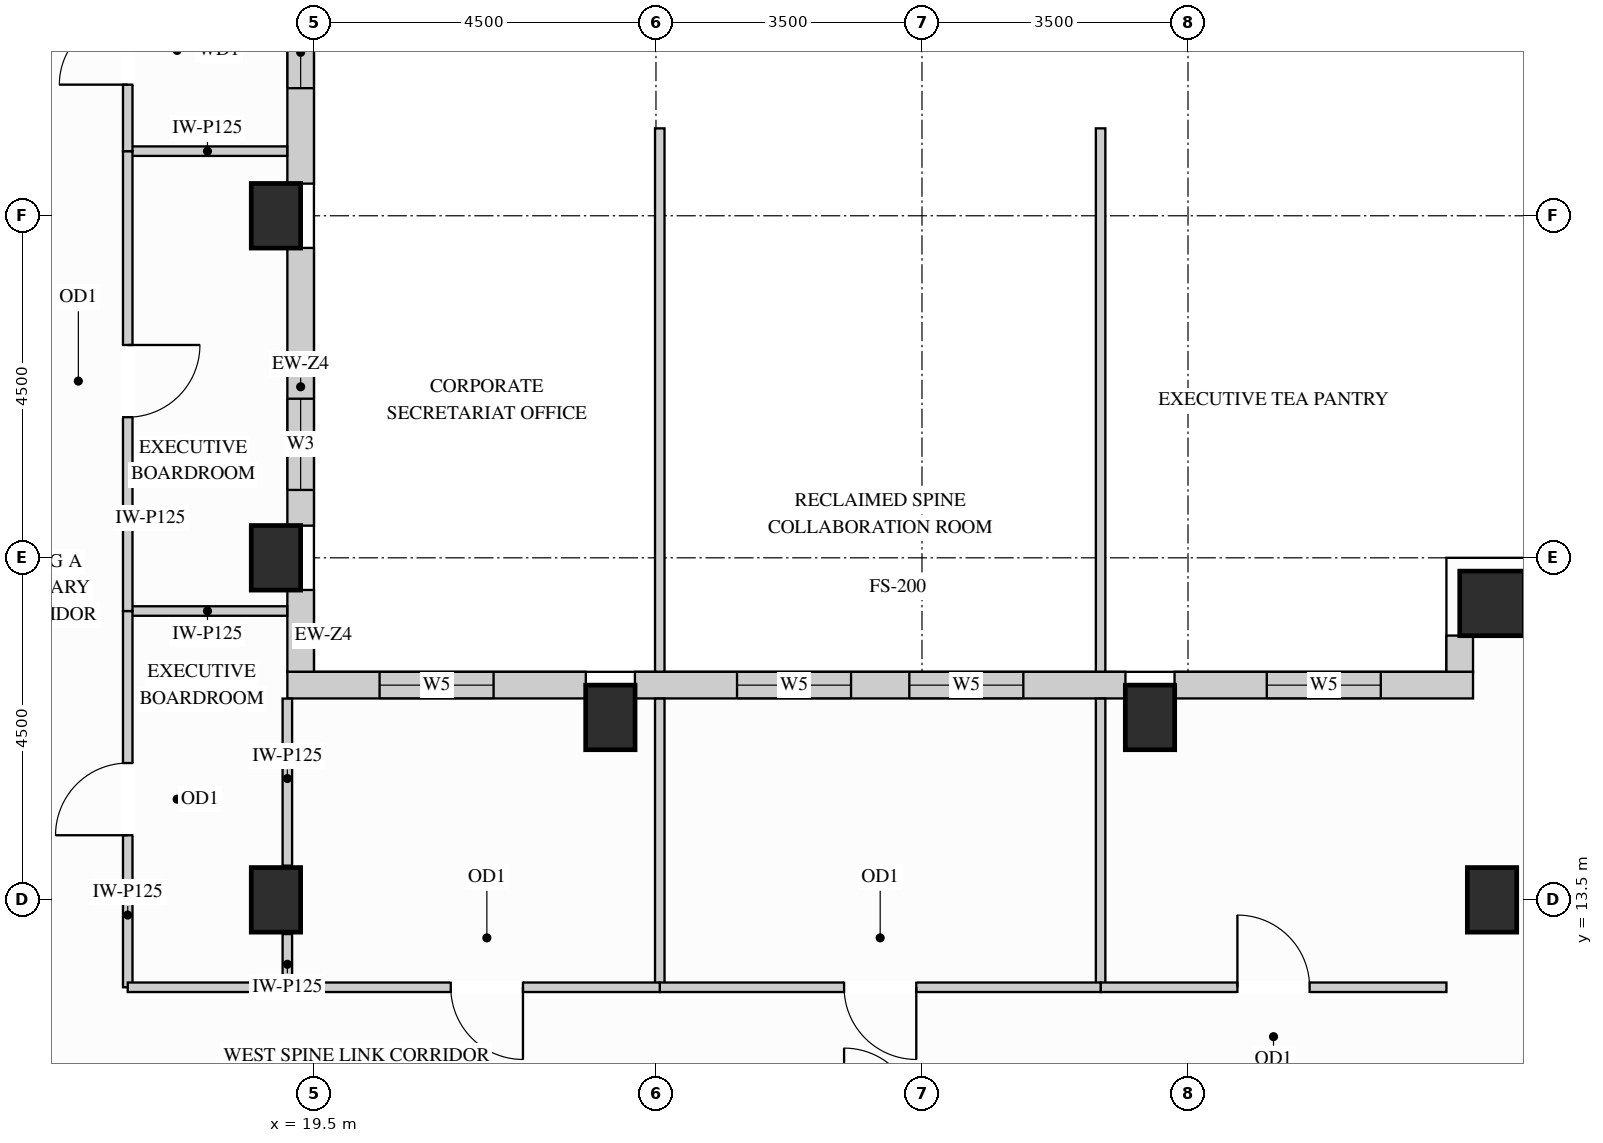
"""IFC4 building model, lengths in metres.
Left out: names, types, materials, properties, quantities, classifications, styles, units other than length and angle.
Written with IfcOpenShell. Run it as: python <this file> out.ifc"""

import sys

from ifc_helpers import new_model, si_unit, direction, frame, frame_2d, origin, origin_2d, place, context, subcontext, project, spatial, rectangle, extrude, source, transform, mapped, element, fill, save


model = new_model("IFC4")
c1 = context("Model", 3, precision=1e-05, world=origin(), true_north=direction((0.0, 1.0)))
c2 = subcontext(c1, "Body", "Model", "MODEL_VIEW")
j1 = project(units=[si_unit("LENGTHUNIT", "METRE"), si_unit("PLANEANGLEUNIT", "RADIAN")], contexts=[c1])
p1 = place(None, origin())
s1 = spatial("IfcSite", under=j1, at=p1, CompositionType="ELEMENT")
p2 = place(p1, origin())
s2 = spatial("IfcBuilding", under=s1, at=p2, CompositionType="ELEMENT")
p3 = place(p2, frame((0.0, 0.0, 223.2)))
s3 = spatial("IfcBuildingStorey", under=s2, at=p3, CompositionType="ELEMENT", Elevation=223.2)
m1 = source(origin(), c2, "Body", "SweptSolid", [
    extrude(rectangle(XDim=0.65, YDim=0.85, at=origin_2d()), origin(), (0.0, 0.0, 1.0), 3.4),
])
for number, where, z_axis, x_axis in (
    (1, (19.0, 13.5, 0.0), (0.0, 0.0, 1.0), (1.0, 0.0, 0.0)),
    (2, (19.0, 18.0, 0.0), (0.0, 0.0, 1.0), (1.0, 0.0, 0.0)),
    (3, (19.0, 22.5, 0.0), (0.0, 0.0, 1.0), (1.0, 0.0, 0.0)),
    (4, (35.0, 13.5, 0.0), (0.0, 0.0, 1.0), (1.0, 0.0, 0.0)),
    (5, (23.4, 15.9, 0.0), (0.0, 0.0, 1.0), (1.0, 0.0, 0.0)),
    (6, (30.5, 15.9, 0.0), (0.0, 0.0, 1.0), (1.0, 0.0, 0.0)),
):
    element("IfcColumn", number, at=place(p3, frame(where, z_axis=z_axis, x_axis=x_axis)), inside=s3, PredefinedType="COLUMN", context=c2, shape_type="MappedRepresentation", body=[
        mapped(m1, transform((0.0, 0.0, 0.0), x_axis=(1.0, 0.0, 0.0), y_axis=(0.0, 1.0, 0.0), z_axis=(0.0, 0.0, 1.0))),
    ])
m2 = source(origin(), c2, "Body", "SweptSolid", [
    extrude(rectangle(XDim=0.85, YDim=0.85, at=origin_2d()), origin(), (0.0, 0.0, 1.0), 3.4),
])
p4 = place(p3, frame((35.0, 17.4, 0.0), z_axis=(0.0, 0.0, 1.0), x_axis=(1.0, 0.0, 0.0)))
e7 = element("IfcColumn", 7, at=p4, inside=s3, PredefinedType="COLUMN", context=c2, shape_type="MappedRepresentation", body=[
    mapped(m2, transform((0.0, 0.0, 0.0), x_axis=(1.0, 0.0, 0.0), y_axis=(0.0, 1.0, 0.0), z_axis=(0.0, 0.0, 1.0))),
])
m3 = source(origin(), c2, "Body", "SweptSolid", [
    extrude(rectangle(XDim=1.079, YDim=0.35, at=frame_2d((0.54, 0.0))), origin(), (0.0, 0.0, 1.0), 2.619),
])
p5 = place(p3, frame((19.325, 16.498, 0.0), z_axis=(0.0, 0.0, 1.0), x_axis=(0.0, 1.0, 0.0)))
e8 = element("IfcWall", 8, at=p5, inside=s3, PredefinedType="SOLIDWALL", context=c2, shape_type="MappedRepresentation", body=[
    mapped(m3, transform((0.0, 0.0, 0.0), x_axis=(1.0, 0.0, 0.0), y_axis=(0.0, 1.0, 0.0), z_axis=(0.0, 0.0, 1.0))),
])
p6 = place(p3, frame((19.325, 18.423, 0.0), z_axis=(0.0, 0.0, 1.0), x_axis=(0.0, 1.0, 0.0)))
e9 = element("IfcWall", 9, at=p6, inside=s3, PredefinedType="SOLIDWALL", context=c2, shape_type="SweptSolid", body=[
    extrude(rectangle(XDim=3.654, YDim=0.35, at=frame_2d((1.827, 0.0))), origin(), (0.0, 0.0, 1.0), 2.619),
])
p7 = place(p6, frame((0.47, 0.0, 0.78)))
e10 = element("IfcOpeningElement", 10, at=p7, cuts=e9, PredefinedType="OPENING", context=c2, shape_type="SweptSolid", body=[
    extrude(rectangle(XDim=1.2, YDim=1.659, at=frame_2d((0.6, 0.83))), frame((0.0, 0.185, 0.0), z_axis=(0.0, -1.0, 0.0), x_axis=(1.0, 0.0, 0.0)), (0.0, 0.0, 1.0), 0.37),
])
p8 = place(p3, frame((19.325, 22.923, 0.0), z_axis=(0.0, 0.0, 1.0), x_axis=(0.0, 1.0, 0.0)))
e11 = element("IfcWall", 11, at=p8, inside=s3, PredefinedType="SOLIDWALL", context=c2, shape_type="SweptSolid", body=[
    extrude(rectangle(XDim=3.454, YDim=0.35, at=frame_2d((1.727, 0.0))), origin(), (0.0, 0.0, 1.0), 2.619),
])
p9 = place(p8, frame((1.256, 0.0, 0.78)))
e12 = element("IfcOpeningElement", 12, at=p9, cuts=e11, PredefinedType="OPENING", context=c2, shape_type="SweptSolid", body=[
    extrude(rectangle(XDim=1.5, YDim=1.659, at=frame_2d((0.75, 0.83))), frame((0.0, 0.185, 0.0), z_axis=(0.0, -1.0, 0.0), x_axis=(1.0, 0.0, 0.0)), (0.0, 0.0, 1.0), 0.37),
])
m4 = source(origin(), c2, "Body", "SweptSolid", [
    extrude(rectangle(XDim=0.479, YDim=0.35, at=frame_2d((0.24, 0.0))), origin(), (0.0, 0.0, 1.0), 3.385),
])
p10 = place(p3, frame((34.575, 16.977, 0.0), z_axis=(0.0, 0.0, 1.0), x_axis=(0.0, -1.0, 0.0)))
e13 = element("IfcWall", 13, at=p10, inside=s3, PredefinedType="SOLIDWALL", context=c2, shape_type="MappedRepresentation", body=[
    mapped(m4, transform((0.0, 0.0, 0.0), x_axis=(1.0, 0.0, 0.0), y_axis=(0.0, 1.0, 0.0), z_axis=(0.0, 0.0, 1.0))),
])
p11 = place(p3, frame((34.75, 16.325, 0.0), z_axis=(0.0, 0.0, 1.0), x_axis=(-1.0, 0.0, 0.0)))
e14 = element("IfcWall", 14, at=p11, inside=s3, PredefinedType="SOLIDWALL", context=c2, shape_type="SweptSolid", body=[
    extrude(rectangle(XDim=3.927, YDim=0.35, at=frame_2d((1.963, 0.0))), origin(), (0.0, 0.0, 1.0), 3.385),
])
p12 = place(p11, frame((1.213, 0.0, 0.78)))
e15 = element("IfcOpeningElement", 15, at=p12, cuts=e14, PredefinedType="OPENING", context=c2, shape_type="SweptSolid", body=[
    extrude(rectangle(XDim=1.5, YDim=2.0, at=frame_2d((0.75, 1.0))), frame((0.0, 0.185, 0.0), z_axis=(0.0, -1.0, 0.0), x_axis=(1.0, 0.0, 0.0)), (0.0, 0.0, 1.0), 0.37),
])
p13 = place(p3, frame((30.177, 16.325, 0.0), z_axis=(0.0, 0.0, 1.0), x_axis=(-1.0, 0.0, 0.0)))
e16 = element("IfcWall", 16, at=p13, inside=s3, PredefinedType="SOLIDWALL", context=c2, shape_type="SweptSolid", body=[
    extrude(rectangle(XDim=6.454, YDim=0.35, at=frame_2d((3.227, 0.0))), origin(), (0.0, 0.0, 1.0), 3.385),
])
p14 = place(p13, frame((1.344, 0.0, 0.78)))
e17 = element("IfcOpeningElement", 17, at=p14, cuts=e16, PredefinedType="OPENING", context=c2, shape_type="SweptSolid", body=[
    extrude(rectangle(XDim=1.5, YDim=2.0, at=frame_2d((0.75, 1.0))), frame((0.0, 0.185, 0.0), z_axis=(0.0, -1.0, 0.0), x_axis=(1.0, 0.0, 0.0)), (0.0, 0.0, 1.0), 0.37),
])
p15 = place(p13, frame((3.61, 0.0, 0.78)))
e18 = element("IfcOpeningElement", 18, at=p15, cuts=e16, PredefinedType="OPENING", context=c2, shape_type="SweptSolid", body=[
    extrude(rectangle(XDim=1.5, YDim=2.0, at=frame_2d((0.75, 1.0))), frame((0.0, 0.185, 0.0), z_axis=(0.0, -1.0, 0.0), x_axis=(1.0, 0.0, 0.0)), (0.0, 0.0, 1.0), 0.37),
])
p16 = place(p3, frame((23.077, 16.325, 0.0), z_axis=(0.0, 0.0, 1.0), x_axis=(-1.0, 0.0, 0.0)))
e19 = element("IfcWall", 19, at=p16, inside=s3, PredefinedType="SOLIDWALL", context=c2, shape_type="SweptSolid", body=[
    extrude(rectangle(XDim=3.927, YDim=0.35, at=frame_2d((1.963, 0.0))), origin(), (0.0, 0.0, 1.0), 3.385),
])
p17 = place(p16, frame((1.213, 0.0, 0.78)))
e20 = element("IfcOpeningElement", 20, at=p17, cuts=e19, PredefinedType="OPENING", context=c2, shape_type="SweptSolid", body=[
    extrude(rectangle(XDim=1.5, YDim=2.0, at=frame_2d((0.75, 1.0))), frame((0.0, 0.185, 0.0), z_axis=(0.0, -1.0, 0.0), x_axis=(1.0, 0.0, 0.0)), (0.0, 0.0, 1.0), 0.37),
])
m5 = source(origin(), c2, "Body", "SweptSolid", [
    extrude(rectangle(XDim=2.098, YDim=0.125, at=frame_2d((1.049, 0.0))), origin(), (0.0, 0.0, 1.0), 3.385),
])
for number, where, z_axis, x_axis in (
    (21, (17.05, 17.3, 0.0), (0.0, 0.0, 1.0), (1.0, 0.0, 0.0)),
    (22, (17.05, 23.35, 0.0), (0.0, 0.0, 1.0), (1.0, 0.0, 0.0)),
):
    element("IfcWall", number, at=place(p3, frame(where, z_axis=z_axis, x_axis=x_axis)), inside=s3, PredefinedType="PARTITIONING", context=c2, shape_type="MappedRepresentation", body=[
        mapped(m5, transform((0.0, 0.0, 0.0), x_axis=(1.0, 0.0, 0.0), y_axis=(0.0, 1.0, 0.0), z_axis=(0.0, 0.0, 1.0))),
    ])
m6 = source(origin(), c2, "Body", "SweptSolid", [
    extrude(rectangle(XDim=0.7, YDim=0.125, at=frame_2d((0.35, 0.0))), origin(), (0.0, 0.0, 1.0), 2.773),
])
p18 = place(p3, frame((19.15, 12.35, 0.0), z_axis=(0.0, 0.0, 1.0), x_axis=(0.0, 1.0, 0.0)))
e23 = element("IfcWall", 23, at=p18, inside=s3, PredefinedType="PARTITIONING", context=c2, shape_type="MappedRepresentation", body=[
    mapped(m6, transform((0.0, 0.0, 0.0), x_axis=(1.0, 0.0, 0.0), y_axis=(0.0, 1.0, 0.0), z_axis=(0.0, 0.0, 1.0))),
])
m7 = source(origin(), c2, "Body", "SweptSolid", [
    extrude(rectangle(XDim=2.198, YDim=0.125, at=frame_2d((1.099, 0.0))), origin(), (0.0, 0.0, 1.0), 2.619),
])
p19 = place(p3, frame((19.15, 13.95, 0.0), z_axis=(0.0, 0.0, 1.0), x_axis=(0.0, 1.0, 0.0)))
e24 = element("IfcWall", 24, at=p19, inside=s3, PredefinedType="PARTITIONING", context=c2, shape_type="MappedRepresentation", body=[
    mapped(m7, transform((0.0, 0.0, 0.0), x_axis=(1.0, 0.0, 0.0), y_axis=(0.0, 1.0, 0.0), z_axis=(0.0, 0.0, 1.0))),
])
p20 = place(p3, frame((17.05, 12.35, 0.0), z_axis=(0.0, 0.0, 1.0), x_axis=(0.0, 1.0, 0.0)))
e25 = element("IfcWall", 25, at=p20, inside=s3, PredefinedType="PARTITIONING", context=c2, shape_type="SweptSolid", body=[
    extrude(rectangle(XDim=4.95, YDim=0.125, at=frame_2d((2.475, 0.0))), origin(), (0.0, 0.0, 1.0), 3.385),
])
p21 = place(p20, frame((2.0, 0.0, 0.0)))
e26 = element("IfcOpeningElement", 26, at=p21, cuts=e25, PredefinedType="OPENING", context=c2, shape_type="SweptSolid", body=[
    extrude(rectangle(XDim=0.95, YDim=2.15, at=frame_2d((0.475, 1.075))), frame((0.0, 0.073, 0.0), z_axis=(0.0, -1.0, 0.0), x_axis=(1.0, 0.0, 0.0)), (0.0, 0.0, 1.0), 0.145),
])
p22 = place(p3, frame((17.05, 17.3, 0.0), z_axis=(0.0, 0.0, 1.0), x_axis=(0.0, 1.0, 0.0)))
e27 = element("IfcWall", 27, at=p22, inside=s3, PredefinedType="PARTITIONING", context=c2, shape_type="SweptSolid", body=[
    extrude(rectangle(XDim=6.05, YDim=0.125, at=frame_2d((3.025, 0.0))), origin(), (0.0, 0.0, 1.0), 3.385),
])
p23 = place(p22, frame((2.55, 0.0, 0.0)))
e28 = element("IfcOpeningElement", 28, at=p23, cuts=e27, PredefinedType="OPENING", context=c2, shape_type="SweptSolid", body=[
    extrude(rectangle(XDim=0.95, YDim=2.15, at=frame_2d((0.475, 1.075))), frame((0.0, 0.073, 0.0), z_axis=(0.0, -1.0, 0.0), x_axis=(1.0, 0.0, 0.0)), (0.0, 0.0, 1.0), 0.145),
])
p24 = place(p3, frame((17.05, 23.35, 0.0), z_axis=(0.0, 0.0, 1.0), x_axis=(0.0, 1.0, 0.0)))
e29 = element("IfcWall", 29, at=p24, inside=s3, PredefinedType="PARTITIONING", context=c2, shape_type="SweptSolid", body=[
    extrude(rectangle(XDim=2.7, YDim=0.125, at=frame_2d((1.35, 0.0))), origin(), (0.0, 0.0, 1.0), 3.385),
])
p25 = place(p24, frame((0.875, 0.0, 0.0)))
e30 = element("IfcOpeningElement", 30, at=p25, cuts=e29, PredefinedType="OPENING", context=c2, shape_type="SweptSolid", body=[
    extrude(rectangle(XDim=0.9, YDim=2.15, at=frame_2d((0.45, 1.075))), frame((0.0, 0.073, 0.0), z_axis=(0.0, -1.0, 0.0), x_axis=(1.0, 0.0, 0.0)), (0.0, 0.0, 1.0), 0.145),
])
m8 = source(origin(), c2, "Body", "SweptSolid", [
    extrude(rectangle(XDim=3.798, YDim=0.125, at=frame_2d((1.899, 0.0))), origin(), (0.0, 0.0, 1.0), 3.385),
])
p26 = place(p3, frame((24.05, 12.35, 0.0), z_axis=(0.0, 0.0, 1.0), x_axis=(0.0, 1.0, 0.0)))
e31 = element("IfcWall", 31, at=p26, inside=s3, PredefinedType="PARTITIONING", context=c2, shape_type="MappedRepresentation", body=[
    mapped(m8, transform((0.0, 0.0, 0.0), x_axis=(1.0, 0.0, 0.0), y_axis=(0.0, 1.0, 0.0), z_axis=(0.0, 0.0, 1.0))),
])
m9 = source(origin(), c2, "Body", "SweptSolid", [
    extrude(rectangle(XDim=7.148, YDim=0.125, at=frame_2d((3.574, 0.0))), origin(), (0.0, 0.0, 1.0), 3.385),
])
p27 = place(p3, frame((24.05, 16.502, 0.0), z_axis=(0.0, 0.0, 1.0), x_axis=(0.0, 1.0, 0.0)))
e32 = element("IfcWall", 32, at=p27, inside=s3, PredefinedType="PARTITIONING", context=c2, shape_type="MappedRepresentation", body=[
    mapped(m9, transform((0.0, 0.0, 0.0), x_axis=(1.0, 0.0, 0.0), y_axis=(0.0, 1.0, 0.0), z_axis=(0.0, 0.0, 1.0))),
])
p28 = place(p3, frame((29.85, 12.35, 0.0), z_axis=(0.0, 0.0, 1.0), x_axis=(0.0, 1.0, 0.0)))
e33 = element("IfcWall", 33, at=p28, inside=s3, PredefinedType="PARTITIONING", context=c2, shape_type="MappedRepresentation", body=[
    mapped(m8, transform((0.0, 0.0, 0.0), x_axis=(1.0, 0.0, 0.0), y_axis=(0.0, 1.0, 0.0), z_axis=(0.0, 0.0, 1.0))),
])
p29 = place(p3, frame((29.85, 16.502, 0.0), z_axis=(0.0, 0.0, 1.0), x_axis=(0.0, 1.0, 0.0)))
e34 = element("IfcWall", 34, at=p29, inside=s3, PredefinedType="PARTITIONING", context=c2, shape_type="MappedRepresentation", body=[
    mapped(m9, transform((0.0, 0.0, 0.0), x_axis=(1.0, 0.0, 0.0), y_axis=(0.0, 1.0, 0.0), z_axis=(0.0, 0.0, 1.0))),
])
p30 = place(p3, frame((29.85, 12.35, 0.0), z_axis=(0.0, 0.0, 1.0), x_axis=(1.0, 0.0, 0.0)))
e35 = element("IfcWall", 35, at=p30, inside=s3, PredefinedType="PARTITIONING", context=c2, shape_type="SweptSolid", body=[
    extrude(rectangle(XDim=4.55, YDim=0.125, at=frame_2d((2.275, 0.0))), origin(), (0.0, 0.0, 1.0), 3.385),
])
p31 = place(p30, frame((1.8, 0.0, 0.0)))
e36 = element("IfcOpeningElement", 36, at=p31, cuts=e35, PredefinedType="OPENING", context=c2, shape_type="SweptSolid", body=[
    extrude(rectangle(XDim=0.95, YDim=2.15, at=frame_2d((0.475, 1.075))), frame((0.0, 0.073, 0.0), z_axis=(0.0, -1.0, 0.0), x_axis=(1.0, 0.0, 0.0)), (0.0, 0.0, 1.0), 0.145),
])
p32 = place(p3, frame((24.05, 12.35, 0.0), z_axis=(0.0, 0.0, 1.0), x_axis=(1.0, 0.0, 0.0)))
e37 = element("IfcWall", 37, at=p32, inside=s3, PredefinedType="PARTITIONING", context=c2, shape_type="SweptSolid", body=[
    extrude(rectangle(XDim=5.8, YDim=0.125, at=frame_2d((2.9, 0.0))), origin(), (0.0, 0.0, 1.0), 3.385),
])
p33 = place(p32, frame((2.425, 0.0, 0.0)))
e38 = element("IfcOpeningElement", 38, at=p33, cuts=e37, PredefinedType="OPENING", context=c2, shape_type="SweptSolid", body=[
    extrude(rectangle(XDim=0.95, YDim=2.15, at=frame_2d((0.475, 1.075))), frame((0.0, 0.073, 0.0), z_axis=(0.0, -1.0, 0.0), x_axis=(1.0, 0.0, 0.0)), (0.0, 0.0, 1.0), 0.145),
])
m10 = source(origin(), c2, "Body", "SweptSolid", [
    extrude(rectangle(XDim=2.45, YDim=0.125, at=frame_2d((1.225, 0.0))), origin(), (0.0, 0.0, 1.0), 3.385),
])
p34 = place(p3, frame((17.05, 12.35, 0.0), z_axis=(0.0, 0.0, 1.0), x_axis=(1.0, 0.0, 0.0)))
e39 = element("IfcWall", 39, at=p34, inside=s3, PredefinedType="PARTITIONING", context=c2, shape_type="MappedRepresentation", body=[
    mapped(m10, transform((0.0, 0.0, 0.0), x_axis=(1.0, 0.0, 0.0), y_axis=(0.0, 1.0, 0.0), z_axis=(0.0, 0.0, 1.0))),
])
p35 = place(p3, frame((19.5, 12.35, 0.0), z_axis=(0.0, 0.0, 1.0), x_axis=(1.0, 0.0, 0.0)))
e40 = element("IfcWall", 40, at=p35, inside=s3, PredefinedType="PARTITIONING", context=c2, shape_type="SweptSolid", body=[
    extrude(rectangle(XDim=4.55, YDim=0.125, at=frame_2d((2.275, 0.0))), origin(), (0.0, 0.0, 1.0), 3.385),
])
p36 = place(p35, frame((1.8, 0.0, 0.0)))
e41 = element("IfcOpeningElement", 41, at=p36, cuts=e40, PredefinedType="OPENING", context=c2, shape_type="SweptSolid", body=[
    extrude(rectangle(XDim=0.95, YDim=2.15, at=frame_2d((0.475, 1.075))), frame((0.0, 0.073, 0.0), z_axis=(0.0, -1.0, 0.0), x_axis=(1.0, 0.0, 0.0)), (0.0, 0.0, 1.0), 0.145),
])
m11 = source(origin(), c2, "Body", "SweptSolid", [
    extrude(rectangle(XDim=0.95, YDim=2.15, at=frame_2d((0.475, 1.075))), frame((0.0, 0.025, 0.0), z_axis=(0.0, -1.0, 0.0), x_axis=(1.0, 0.0, 0.0)), (0.0, 0.0, 1.0), 0.05),
])
p37 = place(p21, origin())
e42 = element("IfcDoor", 42, at=p37, inside=s3, OperationType="SINGLE_SWING_LEFT", PredefinedType="DOOR", context=c2, shape_type="MappedRepresentation", body=[
    mapped(m11, transform((0.0, 0.0, 0.0), x_axis=(1.0, 0.0, 0.0), y_axis=(0.0, 1.0, 0.0), z_axis=(0.0, 0.0, 1.0))),
])
fill(e26, e42)
p38 = place(p23, origin())
e43 = element("IfcDoor", 43, at=p38, inside=s3, OperationType="SINGLE_SWING_RIGHT", PredefinedType="DOOR", context=c2, shape_type="MappedRepresentation", body=[
    mapped(m11, transform((0.0, 0.0, 0.0), x_axis=(1.0, 0.0, 0.0), y_axis=(0.0, 1.0, 0.0), z_axis=(0.0, 0.0, 1.0))),
])
fill(e28, e43)
p39 = place(p33, origin())
e44 = element("IfcDoor", 44, at=p39, inside=s3, OperationType="SINGLE_SWING_RIGHT", PredefinedType="DOOR", context=c2, shape_type="MappedRepresentation", body=[
    mapped(m11, transform((0.0, 0.0, 0.0), x_axis=(1.0, 0.0, 0.0), y_axis=(0.0, 1.0, 0.0), z_axis=(0.0, 0.0, 1.0))),
])
fill(e38, e44)
p40 = place(p36, origin())
e45 = element("IfcDoor", 45, at=p40, inside=s3, OperationType="SINGLE_SWING_RIGHT", PredefinedType="DOOR", context=c2, shape_type="MappedRepresentation", body=[
    mapped(m11, transform((0.0, 0.0, 0.0), x_axis=(1.0, 0.0, 0.0), y_axis=(0.0, 1.0, 0.0), z_axis=(0.0, 0.0, 1.0))),
])
fill(e41, e45)
p41 = place(p31, origin())
e46 = element("IfcDoor", 46, at=p41, inside=s3, OperationType="SINGLE_SWING_LEFT", PredefinedType="DOOR", context=c2, shape_type="MappedRepresentation", body=[
    mapped(m11, transform((0.0, 0.0, 0.0), x_axis=(1.0, 0.0, 0.0), y_axis=(0.0, 1.0, 0.0), z_axis=(0.0, 0.0, 1.0))),
])
fill(e36, e46)
m12 = source(origin(), c2, "Body", "SweptSolid", [
    extrude(rectangle(XDim=0.9, YDim=2.15, at=frame_2d((0.45, 1.075))), frame((0.0, 0.025, 0.0), z_axis=(0.0, -1.0, 0.0), x_axis=(1.0, 0.0, 0.0)), (0.0, 0.0, 1.0), 0.05),
])
p42 = place(p25, origin())
e47 = element("IfcDoor", 47, at=p42, inside=s3, OperationType="SINGLE_SWING_LEFT", PredefinedType="DOOR", context=c2, shape_type="MappedRepresentation", body=[
    mapped(m12, transform((0.0, 0.0, 0.0), x_axis=(1.0, 0.0, 0.0), y_axis=(0.0, 1.0, 0.0), z_axis=(0.0, 0.0, 1.0))),
])
fill(e30, e47)
m13 = source(origin(), c2, "Body", "SweptSolid", [
    extrude(rectangle(XDim=1.2, YDim=1.659, at=frame_2d((0.6, 0.83))), frame((0.0, 0.03, 0.0), z_axis=(0.0, -1.0, 0.0), x_axis=(1.0, 0.0, 0.0)), (0.0, 0.0, 1.0), 0.06),
])
p43 = place(p7, origin())
e48 = element("IfcWindow", 48, at=p43, inside=s3, PartitioningType="SINGLE_PANEL", PredefinedType="WINDOW", context=c2, shape_type="MappedRepresentation", body=[
    mapped(m13, transform((0.0, 0.0, 0.0), x_axis=(1.0, 0.0, 0.0), y_axis=(0.0, 1.0, 0.0), z_axis=(0.0, 0.0, 1.0))),
])
fill(e10, e48)
m14 = source(origin(), c2, "Body", "SweptSolid", [
    extrude(rectangle(XDim=1.5, YDim=1.659, at=frame_2d((0.75, 0.83))), frame((0.0, 0.03, 0.0), z_axis=(0.0, -1.0, 0.0), x_axis=(1.0, 0.0, 0.0)), (0.0, 0.0, 1.0), 0.06),
])
p44 = place(p9, origin())
e49 = element("IfcWindow", 49, at=p44, inside=s3, PartitioningType="SINGLE_PANEL", PredefinedType="WINDOW", context=c2, shape_type="MappedRepresentation", body=[
    mapped(m14, transform((0.0, 0.0, 0.0), x_axis=(1.0, 0.0, 0.0), y_axis=(0.0, 1.0, 0.0), z_axis=(0.0, 0.0, 1.0))),
])
fill(e12, e49)
m15 = source(origin(), c2, "Body", "SweptSolid", [
    extrude(rectangle(XDim=1.5, YDim=2.0, at=frame_2d((0.75, 1.0))), frame((0.0, 0.03, 0.0), z_axis=(0.0, -1.0, 0.0), x_axis=(1.0, 0.0, 0.0)), (0.0, 0.0, 1.0), 0.06),
])
p45 = place(p12, origin())
e50 = element("IfcWindow", 50, at=p45, inside=s3, PartitioningType="SINGLE_PANEL", PredefinedType="WINDOW", context=c2, shape_type="MappedRepresentation", body=[
    mapped(m15, transform((0.0, 0.0, 0.0), x_axis=(1.0, 0.0, 0.0), y_axis=(0.0, 1.0, 0.0), z_axis=(0.0, 0.0, 1.0))),
])
fill(e15, e50)
p46 = place(p14, origin())
e51 = element("IfcWindow", 51, at=p46, inside=s3, PartitioningType="SINGLE_PANEL", PredefinedType="WINDOW", context=c2, shape_type="MappedRepresentation", body=[
    mapped(m15, transform((0.0, 0.0, 0.0), x_axis=(1.0, 0.0, 0.0), y_axis=(0.0, 1.0, 0.0), z_axis=(0.0, 0.0, 1.0))),
])
fill(e17, e51)
p47 = place(p15, origin())
e52 = element("IfcWindow", 52, at=p47, inside=s3, PartitioningType="SINGLE_PANEL", PredefinedType="WINDOW", context=c2, shape_type="MappedRepresentation", body=[
    mapped(m15, transform((0.0, 0.0, 0.0), x_axis=(1.0, 0.0, 0.0), y_axis=(0.0, 1.0, 0.0), z_axis=(0.0, 0.0, 1.0))),
])
fill(e18, e52)
p48 = place(p17, origin())
e53 = element("IfcWindow", 53, at=p48, inside=s3, PartitioningType="SINGLE_PANEL", PredefinedType="WINDOW", context=c2, shape_type="MappedRepresentation", body=[
    mapped(m15, transform((0.0, 0.0, 0.0), x_axis=(1.0, 0.0, 0.0), y_axis=(0.0, 1.0, 0.0), z_axis=(0.0, 0.0, 1.0))),
])
fill(e20, e53)
save(model, sys.argv[1])
